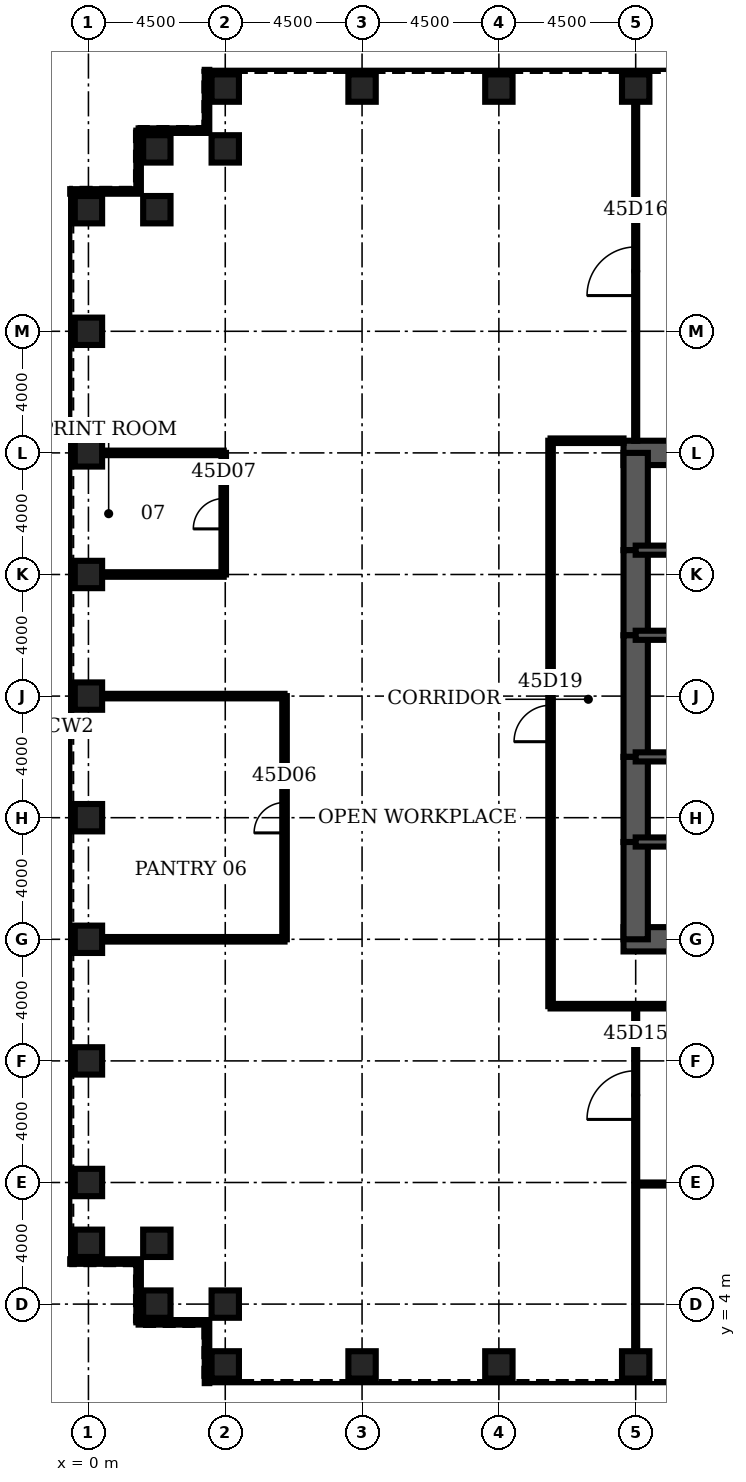
"""IFC4 building model, lengths in metres.
Left out: names, types, materials, properties, quantities, classifications, styles, units other than length and angle.
Written with IfcOpenShell. Run it as: python <this file> out.ifc"""

import sys

from ifc_helpers import new_model, si_unit, direction, frame, frame_2d, origin, origin_2d, place, context, subcontext, project, spatial, rectangle, hollow_rectangle, extrude, element, fill, save


model = new_model("IFC4")
c1 = context("Model", 3, precision=1e-05, world=origin(), true_north=direction((0.0, 1.0)))
c2 = subcontext(c1, "Body", "Model", "MODEL_VIEW")
j1 = project(units=[si_unit("LENGTHUNIT", "METRE"), si_unit("PLANEANGLEUNIT", "RADIAN")], contexts=[c1])
p1 = place(None, origin())
s1 = spatial("IfcSite", under=j1, at=p1, CompositionType="ELEMENT")
p2 = place(p1, origin())
s2 = spatial("IfcBuilding", under=s1, at=p2, CompositionType="ELEMENT")
p3 = place(p2, frame((0.0, 0.0, 202.6)))
s3 = spatial("IfcBuildingStorey", under=s2, at=p3, CompositionType="ELEMENT", Elevation=202.6)
for number, where, z_axis, x_axis in (
    (1, (4.5, 2.0, 0.0), (0.0, 0.0, 1.0), (0.0, 1.0, 0.0)),
    (2, (9.0, 2.0, 0.0), (0.0, 0.0, 1.0), (0.0, 1.0, 0.0)),
    (3, (13.5, 2.0, 0.0), (0.0, 0.0, 1.0), (0.0, 1.0, 0.0)),
    (4, (18.0, 2.0, 0.0), (0.0, 0.0, 1.0), (0.0, 1.0, 0.0)),
    (5, (18.0, 44.0, 0.0), (0.0, 0.0, 1.0), (0.0, 1.0, 0.0)),
    (6, (13.5, 44.0, 0.0), (0.0, 0.0, 1.0), (0.0, 1.0, 0.0)),
    (7, (9.0, 44.0, 0.0), (0.0, 0.0, 1.0), (0.0, 1.0, 0.0)),
    (8, (4.5, 44.0, 0.0), (0.0, 0.0, 1.0), (0.0, 1.0, 0.0)),
    (9, (4.5, 42.0, 0.0), (0.0, 0.0, 1.0), (0.0, 1.0, 0.0)),
    (10, (2.25, 42.0, 0.0), (0.0, 0.0, 1.0), (1.0, 0.0, 0.0)),
    (11, (2.25, 40.0, 0.0), (0.0, 0.0, 1.0), (1.0, 0.0, 0.0)),
    (12, (0.0, 40.0, 0.0), (0.0, 0.0, 1.0), (1.0, 0.0, 0.0)),
    (13, (0.0, 36.0, 0.0), (0.0, 0.0, 1.0), (1.0, 0.0, 0.0)),
    (14, (0.0, 32.0, 0.0), (0.0, 0.0, 1.0), (1.0, 0.0, 0.0)),
    (15, (0.0, 28.0, 0.0), (0.0, 0.0, 1.0), (1.0, 0.0, 0.0)),
    (16, (0.0, 24.0, 0.0), (0.0, 0.0, 1.0), (1.0, 0.0, 0.0)),
    (17, (0.0, 20.0, 0.0), (0.0, 0.0, 1.0), (1.0, 0.0, 0.0)),
    (18, (0.0, 16.0, 0.0), (0.0, 0.0, 1.0), (1.0, 0.0, 0.0)),
    (19, (0.0, 12.0, 0.0), (0.0, 0.0, 1.0), (1.0, 0.0, 0.0)),
    (20, (0.0, 8.0, 0.0), (0.0, 0.0, 1.0), (1.0, 0.0, 0.0)),
    (21, (0.0, 6.0, 0.0), (0.0, 0.0, 1.0), (1.0, 0.0, 0.0)),
    (22, (2.25, 6.0, 0.0), (0.0, 0.0, 1.0), (1.0, 0.0, 0.0)),
    (23, (2.25, 4.0, 0.0), (0.0, 0.0, 1.0), (1.0, 0.0, 0.0)),
    (24, (4.5, 4.0, 0.0), (0.0, 0.0, 1.0), (0.0, 1.0, 0.0)),
):
    element("IfcColumn", number, at=place(p3, frame(where, z_axis=z_axis, x_axis=x_axis)), inside=s3, PredefinedType="COLUMN", context=c2, shape_type="SweptSolid", body=[
        extrude(hollow_rectangle(XDim=0.9, YDim=0.9, WallThickness=0.09, at=origin_2d()), origin(), (0.0, 0.0, 1.0), 4.2),
    ])
for number, where, z_axis, x_axis in (
    (25, (17.6, 16.0, 0.0), (0.0, 0.0, 1.0), (1.0, 0.0, 0.0)),
    (26, (27.0, 32.0, 0.0), (0.0, 0.0, 1.0), (-1.0, 0.0, 0.0)),
):
    element("IfcWall", number, at=place(p3, frame(where, z_axis=z_axis, x_axis=x_axis)), inside=s3, PredefinedType="SHEAR", context=c2, shape_type="SweptSolid", body=[
        extrude(rectangle(XDim=9.4, YDim=0.8, at=frame_2d((4.7, 0.0))), origin(), (0.0, 0.0, 1.0), 4.2),
    ])
p4 = place(p3, frame((18.0, 32.0, 0.0), z_axis=(0.0, 0.0, 1.0), x_axis=(0.0, -1.0, 0.0)))
e27 = element("IfcWall", 27, at=p4, inside=s3, PredefinedType="SHEAR", context=c2, shape_type="SweptSolid", body=[
    extrude(rectangle(XDim=3.2, YDim=0.8, at=frame_2d((1.6, 0.0))), origin(), (0.0, 0.0, 1.0), 4.2),
])
p5 = place(p3, frame((18.0, 28.8, 0.0), z_axis=(0.0, 0.0, 1.0), x_axis=(0.0, -1.0, 0.0)))
e28 = element("IfcWall", 28, at=p5, inside=s3, PredefinedType="SHEAR", context=c2, shape_type="SweptSolid", body=[
    extrude(rectangle(XDim=2.8, YDim=0.8, at=frame_2d((1.4, 0.0))), origin(), (0.0, 0.0, 1.0), 4.2),
])
p6 = place(p5, frame((0.4, 0.0, 0.0)))
e29 = element("IfcOpeningElement", 29, at=p6, cuts=e28, PredefinedType="OPENING", context=c2, shape_type="SweptSolid", body=[
    extrude(rectangle(XDim=1.8, YDim=2.1, at=frame_2d((0.9, 1.05))), frame((0.0, 0.41, 0.0), z_axis=(0.0, -1.0, 0.0), x_axis=(1.0, 0.0, 0.0)), (0.0, 0.0, 1.0), 0.82),
])
p7 = place(p3, frame((18.0, 26.0, 0.0), z_axis=(0.0, 0.0, 1.0), x_axis=(0.0, -1.0, 0.0)))
e30 = element("IfcWall", 30, at=p7, inside=s3, PredefinedType="SHEAR", context=c2, shape_type="SweptSolid", body=[
    extrude(rectangle(XDim=4.0, YDim=0.8, at=frame_2d((2.0, 0.0))), origin(), (0.0, 0.0, 1.0), 4.2),
])
p8 = place(p3, frame((18.0, 22.0, 0.0), z_axis=(0.0, 0.0, 1.0), x_axis=(0.0, -1.0, 0.0)))
e31 = element("IfcWall", 31, at=p8, inside=s3, PredefinedType="SHEAR", context=c2, shape_type="SweptSolid", body=[
    extrude(rectangle(XDim=2.8, YDim=0.8, at=frame_2d((1.4, 0.0))), origin(), (0.0, 0.0, 1.0), 4.2),
])
p9 = place(p8, frame((0.6, 0.0, 0.0)))
e32 = element("IfcOpeningElement", 32, at=p9, cuts=e31, PredefinedType="OPENING", context=c2, shape_type="SweptSolid", body=[
    extrude(rectangle(XDim=1.8, YDim=2.1, at=frame_2d((0.9, 1.05))), frame((0.0, 0.41, 0.0), z_axis=(0.0, -1.0, 0.0), x_axis=(1.0, 0.0, 0.0)), (0.0, 0.0, 1.0), 0.82),
])
p10 = place(p3, frame((18.0, 19.2, 0.0), z_axis=(0.0, 0.0, 1.0), x_axis=(0.0, -1.0, 0.0)))
e33 = element("IfcWall", 33, at=p10, inside=s3, PredefinedType="SHEAR", context=c2, shape_type="SweptSolid", body=[
    extrude(rectangle(XDim=3.2, YDim=0.8, at=frame_2d((1.6, 0.0))), origin(), (0.0, 0.0, 1.0), 4.2),
])
p11 = place(p3, frame((18.0, 19.2, 0.0), z_axis=(0.0, 0.0, 1.0), x_axis=(1.0, 0.0, 0.0)))
e34 = element("IfcWall", 34, at=p11, inside=s3, PredefinedType="SOLIDWALL", context=c2, shape_type="SweptSolid", body=[
    extrude(rectangle(XDim=9.0, YDim=0.3, at=frame_2d((4.5, 0.0))), origin(), (0.0, 0.0, 1.0), 4.2),
])
p12 = place(p11, frame((0.65, 0.0, 0.0)))
e35 = element("IfcOpeningElement", 35, at=p12, cuts=e34, PredefinedType="OPENING", context=c2, shape_type="SweptSolid", body=[
    extrude(rectangle(XDim=1.0, YDim=2.1, at=frame_2d((0.5, 1.05))), frame((0.0, 0.16, 0.0), z_axis=(0.0, -1.0, 0.0), x_axis=(1.0, 0.0, 0.0)), (0.0, 0.0, 1.0), 0.32),
])
p13 = place(p3, frame((18.0, 28.8, 0.0), z_axis=(0.0, 0.0, 1.0), x_axis=(1.0, 0.0, 0.0)))
e36 = element("IfcWall", 36, at=p13, inside=s3, PredefinedType="SOLIDWALL", context=c2, shape_type="SweptSolid", body=[
    extrude(rectangle(XDim=9.0, YDim=0.3, at=frame_2d((4.5, 0.0))), origin(), (0.0, 0.0, 1.0), 4.2),
])
p14 = place(p13, frame((0.65, 0.0, 0.0)))
e37 = element("IfcOpeningElement", 37, at=p14, cuts=e36, PredefinedType="OPENING", context=c2, shape_type="SweptSolid", body=[
    extrude(rectangle(XDim=1.0, YDim=2.1, at=frame_2d((0.5, 1.05))), frame((0.0, 0.16, 0.0), z_axis=(0.0, -1.0, 0.0), x_axis=(1.0, 0.0, 0.0)), (0.0, 0.0, 1.0), 0.32),
])
p15 = place(p3, frame((18.0, 22.0, 0.0), z_axis=(0.0, 0.0, 1.0), x_axis=(1.0, 0.0, 0.0)))
e38 = element("IfcWall", 38, at=p15, inside=s3, PredefinedType="SOLIDWALL", context=c2, shape_type="SweptSolid", body=[
    extrude(rectangle(XDim=6.0, YDim=0.3, at=frame_2d((3.0, 0.0))), origin(), (0.0, 0.0, 1.0), 4.2),
])
p16 = place(p15, frame((4.4, 0.0, 0.0)))
e39 = element("IfcOpeningElement", 39, at=p16, cuts=e38, PredefinedType="OPENING", context=c2, shape_type="SweptSolid", body=[
    extrude(rectangle(XDim=1.0, YDim=2.1, at=frame_2d((0.5, 1.05))), frame((0.0, 0.16, 0.0), z_axis=(0.0, -1.0, 0.0), x_axis=(1.0, 0.0, 0.0)), (0.0, 0.0, 1.0), 0.32),
])
p17 = place(p15, frame((0.65, 0.0, 0.0)))
e40 = element("IfcOpeningElement", 40, at=p17, cuts=e38, PredefinedType="OPENING", context=c2, shape_type="SweptSolid", body=[
    extrude(rectangle(XDim=1.0, YDim=2.1, at=frame_2d((0.5, 1.05))), frame((0.0, 0.16, 0.0), z_axis=(0.0, -1.0, 0.0), x_axis=(1.0, 0.0, 0.0)), (0.0, 0.0, 1.0), 0.32),
])
p18 = place(p3, frame((18.0, 26.0, 0.0), z_axis=(0.0, 0.0, 1.0), x_axis=(1.0, 0.0, 0.0)))
e41 = element("IfcWall", 41, at=p18, inside=s3, PredefinedType="SOLIDWALL", context=c2, shape_type="SweptSolid", body=[
    extrude(rectangle(XDim=6.0, YDim=0.3, at=frame_2d((3.0, 0.0))), origin(), (0.0, 0.0, 1.0), 4.2),
])
p19 = place(p3, frame((18.0, 7.95, 0.0), z_axis=(0.0, 0.0, 1.0), x_axis=(1.0, 0.0, 0.0)))
e42 = element("IfcWall", 42, at=p19, inside=s3, PredefinedType="PARTITIONING", context=c2, shape_type="SweptSolid", body=[
    extrude(rectangle(XDim=27.0, YDim=0.1, at=frame_2d((13.5, 0.0))), origin(), (0.0, 0.0, 1.0), 3.0),
])
p20 = place(p19, frame((4.0, 0.0, 0.0)))
e43 = element("IfcOpeningElement", 43, at=p20, cuts=e42, PredefinedType="OPENING", context=c2, shape_type="SweptSolid", body=[
    extrude(rectangle(XDim=1.0, YDim=2.1, at=frame_2d((0.5, 1.05))), frame((0.0, 0.06, 0.0), z_axis=(0.0, -1.0, 0.0), x_axis=(1.0, 0.0, 0.0)), (0.0, 0.0, 1.0), 0.12),
])
p21 = place(p19, frame((13.0, 0.0, 0.0)))
e44 = element("IfcOpeningElement", 44, at=p21, cuts=e42, PredefinedType="OPENING", context=c2, shape_type="SweptSolid", body=[
    extrude(rectangle(XDim=1.0, YDim=2.1, at=frame_2d((0.5, 1.05))), frame((0.0, 0.06, 0.0), z_axis=(0.0, -1.0, 0.0), x_axis=(1.0, 0.0, 0.0)), (0.0, 0.0, 1.0), 0.12),
])
p22 = place(p19, frame((22.0, 0.0, 0.0)))
e45 = element("IfcOpeningElement", 45, at=p22, cuts=e42, PredefinedType="OPENING", context=c2, shape_type="SweptSolid", body=[
    extrude(rectangle(XDim=1.0, YDim=2.1, at=frame_2d((0.5, 1.05))), frame((0.0, 0.06, 0.0), z_axis=(0.0, -1.0, 0.0), x_axis=(1.0, 0.0, 0.0)), (0.0, 0.0, 1.0), 0.12),
])
p23 = place(p3, frame((15.2, 13.8, 0.0), z_axis=(0.0, 0.0, 1.0), x_axis=(1.0, 0.0, 0.0)))
e46 = element("IfcWall", 46, at=p23, inside=s3, PredefinedType="PARTITIONING", context=c2, shape_type="SweptSolid", body=[
    extrude(rectangle(XDim=41.6, YDim=0.15, at=frame_2d((20.8, 0.0))), origin(), (0.0, 0.0, 1.0), 3.0),
])
p24 = place(p23, frame((20.2, 0.0, 0.0)))
e47 = element("IfcOpeningElement", 47, at=p24, cuts=e46, PredefinedType="OPENING", context=c2, shape_type="SweptSolid", body=[
    extrude(rectangle(XDim=1.2, YDim=2.1, at=frame_2d((0.6, 1.05))), frame((0.0, 0.085, 0.0), z_axis=(0.0, -1.0, 0.0), x_axis=(1.0, 0.0, 0.0)), (0.0, 0.0, 1.0), 0.17),
])
for number, where, z_axis, x_axis in (
    (48, (0.45, 16.0, 0.0), (0.0, 0.0, 1.0), (1.0, 0.0, 0.0)),
    (49, (0.45, 24.0, 0.0), (0.0, 0.0, 1.0), (1.0, 0.0, 0.0)),
):
    element("IfcWall", number, at=place(p3, frame(where, z_axis=z_axis, x_axis=x_axis)), inside=s3, PredefinedType="PARTITIONING", context=c2, shape_type="SweptSolid", body=[
        extrude(rectangle(XDim=6.0, YDim=0.15, at=frame_2d((3.0, 0.0))), origin(), (0.0, 0.0, 1.0), 3.0),
    ])
for number, where, z_axis, x_axis in (
    (50, (0.45, 28.0, 0.0), (0.0, 0.0, 1.0), (1.0, 0.0, 0.0)),
    (51, (0.45, 32.0, 0.0), (0.0, 0.0, 1.0), (1.0, 0.0, 0.0)),
):
    element("IfcWall", number, at=place(p3, frame(where, z_axis=z_axis, x_axis=x_axis)), inside=s3, PredefinedType="PARTITIONING", context=c2, shape_type="SweptSolid", body=[
        extrude(rectangle(XDim=4.0, YDim=0.15, at=frame_2d((2.0, 0.0))), origin(), (0.0, 0.0, 1.0), 3.0),
    ])
p25 = place(p3, frame((15.2, 32.4, 0.0), z_axis=(0.0, 0.0, 1.0), x_axis=(1.0, 0.0, 0.0)))
e52 = element("IfcWall", 52, at=p25, inside=s3, PredefinedType="PARTITIONING", context=c2, shape_type="SweptSolid", body=[
    extrude(rectangle(XDim=2.4, YDim=0.15, at=frame_2d((1.2, 0.0))), origin(), (0.0, 0.0, 1.0), 3.0),
])
p26 = place(p3, frame((4.45, 28.0, 0.0), z_axis=(0.0, 0.0, 1.0), x_axis=(0.0, 1.0, 0.0)))
e53 = element("IfcWall", 53, at=p26, inside=s3, PredefinedType="PARTITIONING", context=c2, shape_type="SweptSolid", body=[
    extrude(rectangle(XDim=4.0, YDim=0.15, at=frame_2d((2.0, 0.0))), origin(), (0.0, 0.0, 1.0), 3.0),
])
p27 = place(p26, frame((1.5, 0.0, 0.0)))
e54 = element("IfcOpeningElement", 54, at=p27, cuts=e53, PredefinedType="OPENING", context=c2, shape_type="SweptSolid", body=[
    extrude(rectangle(XDim=1.0, YDim=2.1, at=frame_2d((0.5, 1.05))), frame((0.0, 0.085, 0.0), z_axis=(0.0, -1.0, 0.0), x_axis=(1.0, 0.0, 0.0)), (0.0, 0.0, 1.0), 0.17),
])
p28 = place(p3, frame((6.45, 16.0, 0.0), z_axis=(0.0, 0.0, 1.0), x_axis=(0.0, 1.0, 0.0)))
e55 = element("IfcWall", 55, at=p28, inside=s3, PredefinedType="PARTITIONING", context=c2, shape_type="SweptSolid", body=[
    extrude(rectangle(XDim=8.0, YDim=0.15, at=frame_2d((4.0, 0.0))), origin(), (0.0, 0.0, 1.0), 3.0),
])
p29 = place(p28, frame((3.5, 0.0, 0.0)))
e56 = element("IfcOpeningElement", 56, at=p29, cuts=e55, PredefinedType="OPENING", context=c2, shape_type="SweptSolid", body=[
    extrude(rectangle(XDim=1.0, YDim=2.1, at=frame_2d((0.5, 1.05))), frame((0.0, 0.085, 0.0), z_axis=(0.0, -1.0, 0.0), x_axis=(1.0, 0.0, 0.0)), (0.0, 0.0, 1.0), 0.17),
])
p30 = place(p3, frame((15.2, 13.8, 0.0), z_axis=(0.0, 0.0, 1.0), x_axis=(0.0, 1.0, 0.0)))
e57 = element("IfcWall", 57, at=p30, inside=s3, PredefinedType="PARTITIONING", context=c2, shape_type="SweptSolid", body=[
    extrude(rectangle(XDim=18.6, YDim=0.15, at=frame_2d((9.3, 0.0))), origin(), (0.0, 0.0, 1.0), 3.0),
])
p31 = place(p30, frame((8.7, 0.0, 0.0)))
e58 = element("IfcOpeningElement", 58, at=p31, cuts=e57, PredefinedType="OPENING", context=c2, shape_type="SweptSolid", body=[
    extrude(rectangle(XDim=1.2, YDim=2.1, at=frame_2d((0.6, 1.05))), frame((0.0, 0.085, 0.0), z_axis=(0.0, -1.0, 0.0), x_axis=(1.0, 0.0, 0.0)), (0.0, 0.0, 1.0), 0.17),
])
p32 = place(p3, frame((18.0, 2.45, 0.0), z_axis=(0.0, 0.0, 1.0), x_axis=(0.0, 1.0, 0.0)))
e59 = element("IfcWall", 59, at=p32, inside=s3, PredefinedType="PARTITIONING", context=c2, shape_type="SweptSolid", body=[
    extrude(rectangle(XDim=11.35, YDim=0.1, at=frame_2d((5.675, 0.0))), origin(), (0.0, 0.0, 1.0), 3.0),
])
p33 = place(p32, frame((7.625, 0.0, 0.0)))
e60 = element("IfcOpeningElement", 60, at=p33, cuts=e59, PredefinedType="OPENING", context=c2, shape_type="SweptSolid", body=[
    extrude(rectangle(XDim=1.6, YDim=2.1, at=frame_2d((0.8, 1.05))), frame((0.0, 0.06, 0.0), z_axis=(0.0, -1.0, 0.0), x_axis=(1.0, 0.0, 0.0)), (0.0, 0.0, 1.0), 0.12),
])
p34 = place(p3, frame((18.0, 32.4, 0.0), z_axis=(0.0, 0.0, 1.0), x_axis=(0.0, 1.0, 0.0)))
e61 = element("IfcWall", 61, at=p34, inside=s3, PredefinedType="PARTITIONING", context=c2, shape_type="SweptSolid", body=[
    extrude(rectangle(XDim=11.15, YDim=0.1, at=frame_2d((5.575, 0.0))), origin(), (0.0, 0.0, 1.0), 3.0),
])
p35 = place(p34, frame((4.775, 0.0, 0.0)))
e62 = element("IfcOpeningElement", 62, at=p35, cuts=e61, PredefinedType="OPENING", context=c2, shape_type="SweptSolid", body=[
    extrude(rectangle(XDim=1.6, YDim=2.1, at=frame_2d((0.8, 1.05))), frame((0.0, 0.06, 0.0), z_axis=(0.0, -1.0, 0.0), x_axis=(1.0, 0.0, 0.0)), (0.0, 0.0, 1.0), 0.12),
])
p36 = place(p3, frame((3.9, 44.6, 0.0), z_axis=(0.0, 0.0, 1.0), x_axis=(0.0, -1.0, 0.0)))
e63 = element("IfcWall", 63, at=p36, inside=s3, PredefinedType="ELEMENTEDWALL", context=c2, shape_type="SweptSolid", body=[
    extrude(rectangle(XDim=2.0, YDim=0.15, at=frame_2d((1.0, 0.0))), origin(), (0.0, 0.0, 1.0), 4.04),
])
p37 = place(p3, frame((3.9, 42.6, 0.0), z_axis=(0.0, 0.0, 1.0), x_axis=(-1.0, 0.0, 0.0)))
e64 = element("IfcWall", 64, at=p37, inside=s3, PredefinedType="ELEMENTEDWALL", context=c2, shape_type="SweptSolid", body=[
    extrude(rectangle(XDim=2.25, YDim=0.15, at=frame_2d((1.125, 0.0))), origin(), (0.0, 0.0, 1.0), 4.04),
])
p38 = place(p3, frame((1.65, 42.6, 0.0), z_axis=(0.0, 0.0, 1.0), x_axis=(0.0, -1.0, 0.0)))
e65 = element("IfcWall", 65, at=p38, inside=s3, PredefinedType="ELEMENTEDWALL", context=c2, shape_type="SweptSolid", body=[
    extrude(rectangle(XDim=2.0, YDim=0.15, at=frame_2d((1.0, 0.0))), origin(), (0.0, 0.0, 1.0), 4.04),
])
for number, where, z_axis, x_axis in (
    (66, (1.65, 40.6, 0.0), (0.0, 0.0, 1.0), (-1.0, 0.0, 0.0)),
    (67, (-0.6, 5.4, 0.0), (0.0, 0.0, 1.0), (1.0, 0.0, 0.0)),
):
    element("IfcWall", number, at=place(p3, frame(where, z_axis=z_axis, x_axis=x_axis)), inside=s3, PredefinedType="ELEMENTEDWALL", context=c2, shape_type="SweptSolid", body=[
        extrude(rectangle(XDim=2.25, YDim=0.15, at=frame_2d((1.125, 0.0))), origin(), (0.0, 0.0, 1.0), 4.04),
    ])
p39 = place(p3, frame((1.65, 5.4, 0.0), z_axis=(0.0, 0.0, 1.0), x_axis=(0.0, -1.0, 0.0)))
e68 = element("IfcWall", 68, at=p39, inside=s3, PredefinedType="ELEMENTEDWALL", context=c2, shape_type="SweptSolid", body=[
    extrude(rectangle(XDim=2.0, YDim=0.15, at=frame_2d((1.0, 0.0))), origin(), (0.0, 0.0, 1.0), 4.04),
])
p40 = place(p3, frame((1.65, 3.4, 0.0), z_axis=(0.0, 0.0, 1.0), x_axis=(1.0, 0.0, 0.0)))
e69 = element("IfcWall", 69, at=p40, inside=s3, PredefinedType="ELEMENTEDWALL", context=c2, shape_type="SweptSolid", body=[
    extrude(rectangle(XDim=2.25, YDim=0.15, at=frame_2d((1.125, 0.0))), origin(), (0.0, 0.0, 1.0), 4.04),
])
p41 = place(p3, frame((3.9, 3.4, 0.0), z_axis=(0.0, 0.0, 1.0), x_axis=(0.0, -1.0, 0.0)))
e70 = element("IfcWall", 70, at=p41, inside=s3, PredefinedType="ELEMENTEDWALL", context=c2, shape_type="SweptSolid", body=[
    extrude(rectangle(XDim=2.0, YDim=0.15, at=frame_2d((1.0, 0.0))), origin(), (0.0, 0.0, 1.0), 4.04),
])
p42 = place(p29, origin())
e71 = element("IfcDoor", 71, at=p42, inside=s3, OperationType="SINGLE_SWING_LEFT", PredefinedType="DOOR", context=c2, shape_type="SweptSolid", body=[
    extrude(rectangle(XDim=1.0, YDim=2.1, at=frame_2d((0.5, 1.05))), frame((0.0, 0.025, 0.0), z_axis=(0.0, -1.0, 0.0), x_axis=(1.0, 0.0, 0.0)), (0.0, 0.0, 1.0), 0.05),
])
fill(e56, e71)
p43 = place(p27, origin())
e72 = element("IfcDoor", 72, at=p43, inside=s3, OperationType="SINGLE_SWING_LEFT", PredefinedType="DOOR", context=c2, shape_type="SweptSolid", body=[
    extrude(rectangle(XDim=1.0, YDim=2.1, at=frame_2d((0.5, 1.05))), frame((0.0, 0.025, 0.0), z_axis=(0.0, -1.0, 0.0), x_axis=(1.0, 0.0, 0.0)), (0.0, 0.0, 1.0), 0.05),
])
fill(e54, e72)
p44 = place(p33, origin())
e73 = element("IfcDoor", 73, at=p44, inside=s3, OperationType="SINGLE_SWING_LEFT", PredefinedType="DOOR", context=c2, shape_type="SweptSolid", body=[
    extrude(rectangle(XDim=1.6, YDim=2.1, at=frame_2d((0.8, 1.05))), frame((0.0, 0.025, 0.0), z_axis=(0.0, -1.0, 0.0), x_axis=(1.0, 0.0, 0.0)), (0.0, 0.0, 1.0), 0.05),
])
fill(e60, e73)
p45 = place(p35, origin())
e74 = element("IfcDoor", 74, at=p45, inside=s3, OperationType="SINGLE_SWING_LEFT", PredefinedType="DOOR", context=c2, shape_type="SweptSolid", body=[
    extrude(rectangle(XDim=1.6, YDim=2.1, at=frame_2d((0.8, 1.05))), frame((0.0, 0.025, 0.0), z_axis=(0.0, -1.0, 0.0), x_axis=(1.0, 0.0, 0.0)), (0.0, 0.0, 1.0), 0.05),
])
fill(e62, e74)
p46 = place(p31, origin())
e75 = element("IfcDoor", 75, at=p46, inside=s3, OperationType="SINGLE_SWING_LEFT", PredefinedType="DOOR", context=c2, shape_type="SweptSolid", body=[
    extrude(rectangle(XDim=1.2, YDim=2.1, at=frame_2d((0.6, 1.05))), frame((0.0, 0.025, 0.0), z_axis=(0.0, -1.0, 0.0), x_axis=(1.0, 0.0, 0.0)), (0.0, 0.0, 1.0), 0.05),
])
fill(e58, e75)
p47 = place(p12, origin())
e76 = element("IfcDoor", 76, at=p47, inside=s3, OperationType="SINGLE_SWING_LEFT", PredefinedType="DOOR", context=c2, shape_type="SweptSolid", body=[
    extrude(rectangle(XDim=1.0, YDim=2.1, at=frame_2d((0.5, 1.05))), frame((0.0, 0.025, 0.0), z_axis=(0.0, -1.0, 0.0), x_axis=(1.0, 0.0, 0.0)), (0.0, 0.0, 1.0), 0.05),
])
fill(e35, e76)
p48 = place(p14, origin())
e77 = element("IfcDoor", 77, at=p48, inside=s3, OperationType="SINGLE_SWING_LEFT", PredefinedType="DOOR", context=c2, shape_type="SweptSolid", body=[
    extrude(rectangle(XDim=1.0, YDim=2.1, at=frame_2d((0.5, 1.05))), frame((0.0, 0.025, 0.0), z_axis=(0.0, -1.0, 0.0), x_axis=(1.0, 0.0, 0.0)), (0.0, 0.0, 1.0), 0.05),
])
fill(e37, e77)
p49 = place(p9, origin())
e78 = element("IfcDoor", 78, at=p49, inside=s3, OperationType="SINGLE_SWING_LEFT", PredefinedType="DOOR", context=c2, shape_type="SweptSolid", body=[
    extrude(rectangle(XDim=1.8, YDim=2.1, at=frame_2d((0.9, 1.05))), frame((0.0, 0.4, 0.0), z_axis=(0.0, -1.0, 0.0), x_axis=(1.0, 0.0, 0.0)), (0.0, 0.0, 1.0), 0.8),
])
fill(e32, e78)
p50 = place(p6, origin())
e79 = element("IfcDoor", 79, at=p50, inside=s3, OperationType="SINGLE_SWING_LEFT", PredefinedType="DOOR", context=c2, shape_type="SweptSolid", body=[
    extrude(rectangle(XDim=1.8, YDim=2.1, at=frame_2d((0.9, 1.05))), frame((0.0, 0.4, 0.0), z_axis=(0.0, -1.0, 0.0), x_axis=(1.0, 0.0, 0.0)), (0.0, 0.0, 1.0), 0.8),
])
fill(e29, e79)
p51 = place(p17, origin())
e80 = element("IfcDoor", 80, at=p51, inside=s3, OperationType="SINGLE_SWING_LEFT", PredefinedType="DOOR", context=c2, shape_type="SweptSolid", body=[
    extrude(rectangle(XDim=1.0, YDim=2.1, at=frame_2d((0.5, 1.05))), frame((0.0, 0.025, 0.0), z_axis=(0.0, -1.0, 0.0), x_axis=(1.0, 0.0, 0.0)), (0.0, 0.0, 1.0), 0.05),
])
fill(e40, e80)
save(model, sys.argv[1])
